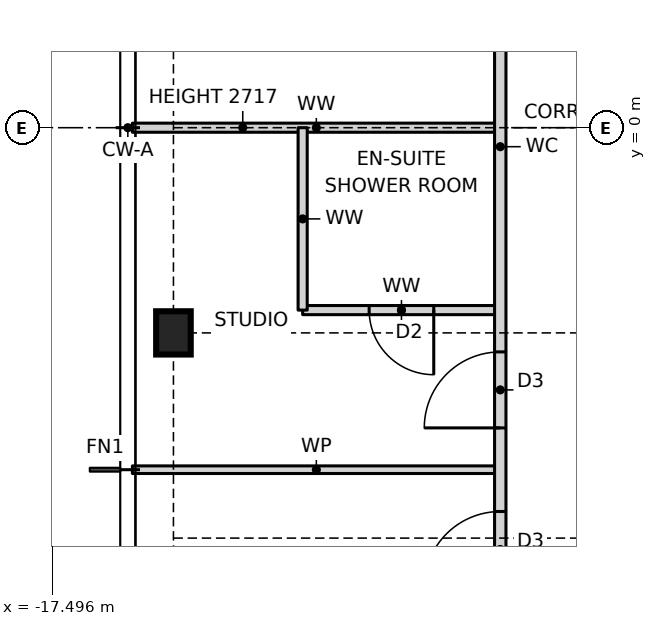
"""IFC4 building model, lengths in metres.
Left out: names, types, materials, properties, quantities, classifications, styles, units other than length and angle.
Written with IfcOpenShell. Run it as: python <this file> out.ifc"""

import sys

from ifc_helpers import new_model, si_unit, direction, frame, frame_2d, origin, origin_2d, place, context, subcontext, project, spatial, rectangle, i_section, extrude, element, fill, save


model = new_model("IFC4")
c1 = context("Model", 3, precision=1e-05, world=origin(), true_north=direction((0.0, 1.0)))
c2 = subcontext(c1, "Body", "Model", "MODEL_VIEW")
j1 = project(units=[si_unit("LENGTHUNIT", "METRE"), si_unit("PLANEANGLEUNIT", "RADIAN")], contexts=[c1])
p1 = place(None, origin())
s1 = spatial("IfcSite", under=j1, at=p1, CompositionType="ELEMENT")
p2 = place(p1, origin())
s2 = spatial("IfcBuilding", under=s1, at=p2, CompositionType="ELEMENT")
p3 = place(p2, frame((0.0, 0.0, 264.0)))
s3 = spatial("IfcBuildingStorey", under=s2, at=p3, CompositionType="ELEMENT", Elevation=264.0)
p4 = place(p3, frame((-15.9, -2.7, 0.0), z_axis=(0.0, 0.0, 1.0), x_axis=(1.0, 0.0, 0.0)))
e1 = element("IfcColumn", 1, at=p4, inside=s3, PredefinedType="COLUMN", context=c2, shape_type="SweptSolid", body=[
    extrude(i_section(OverallWidth=0.455, OverallDepth=0.569, WebThickness=0.078, FlangeThickness=0.125, at=origin_2d()), origin(), (0.0, 0.0, 1.0), 3.5),
])
p5 = place(p3, frame((-16.44, -4.5, 0.0), z_axis=(0.0, 0.0, 1.0), x_axis=(1.0, 0.0, 0.0)))
e2 = element("IfcWall", 2, at=p5, inside=s3, PredefinedType="PARTITIONING", context=c2, shape_type="SweptSolid", body=[
    extrude(rectangle(XDim=4.84, YDim=0.1, at=frame_2d((2.42, 0.0))), origin(), (0.0, 0.0, 1.0), 3.25),
])
p6 = place(p3, frame((-14.2, -2.4, 0.0), z_axis=(0.0, 0.0, 1.0), x_axis=(1.0, 0.0, 0.0)))
e3 = element("IfcWall", 3, at=p6, inside=s3, PredefinedType="PARTITIONING", context=c2, shape_type="SweptSolid", body=[
    extrude(rectangle(XDim=2.6, YDim=0.12, at=frame_2d((1.3, 0.0))), origin(), (0.0, 0.0, 1.0), 3.25),
])
p7 = place(p6, frame((0.875, 0.0, 0.0)))
e4 = element("IfcOpeningElement", 4, at=p7, cuts=e3, PredefinedType="OPENING", context=c2, shape_type="SweptSolid", body=[
    extrude(rectangle(XDim=0.85, YDim=2.1, at=frame_2d((0.425, 1.05))), frame((0.0, 0.07, 0.0), z_axis=(0.0, -1.0, 0.0), x_axis=(1.0, 0.0, 0.0)), (0.0, 0.0, 1.0), 0.14),
])
p8 = place(p3, frame((-16.44, 0.0, 0.0), z_axis=(0.0, 0.0, 1.0), x_axis=(1.0, 0.0, 0.0)))
e5 = element("IfcWall", 5, at=p8, inside=s3, PredefinedType="PARTITIONING", context=c2, shape_type="SweptSolid", body=[
    extrude(rectangle(XDim=4.84, YDim=0.12, at=frame_2d((2.42, 0.0))), origin(), (0.0, 0.0, 1.0), 2.717),
])
p9 = place(p3, frame((-11.6, -12.1, 0.0), z_axis=(0.0, 0.0, 1.0), x_axis=(0.0, 1.0, 0.0)))
e6 = element("IfcWall", 6, at=p9, inside=s3, PredefinedType="PARTITIONING", context=c2, shape_type="SweptSolid", body=[
    extrude(rectangle(XDim=23.7, YDim=0.15, at=frame_2d((11.85, 0.0))), origin(), (0.0, 0.0, 1.0), 3.25),
])
p10 = place(p9, frame((17.15, 0.0, 0.0)))
e7 = element("IfcOpeningElement", 7, at=p10, cuts=e6, PredefinedType="OPENING", context=c2, shape_type="SweptSolid", body=[
    extrude(rectangle(XDim=1.0, YDim=2.1, at=frame_2d((0.5, 1.05))), frame((0.0, 0.085, 0.0), z_axis=(0.0, -1.0, 0.0), x_axis=(1.0, 0.0, 0.0)), (0.0, 0.0, 1.0), 0.17),
])
p11 = place(p9, frame((13.45, 0.0, 0.0)))
e8 = element("IfcOpeningElement", 8, at=p11, cuts=e6, PredefinedType="OPENING", context=c2, shape_type="SweptSolid", body=[
    extrude(rectangle(XDim=1.8, YDim=2.1, at=frame_2d((0.9, 1.05))), frame((0.0, 0.085, 0.0), z_axis=(0.0, -1.0, 0.0), x_axis=(1.0, 0.0, 0.0)), (0.0, 0.0, 1.0), 0.17),
])
p12 = place(p9, frame((8.15, 0.0, 0.0)))
e9 = element("IfcOpeningElement", 9, at=p12, cuts=e6, PredefinedType="OPENING", context=c2, shape_type="SweptSolid", body=[
    extrude(rectangle(XDim=1.0, YDim=2.1, at=frame_2d((0.5, 1.05))), frame((0.0, 0.085, 0.0), z_axis=(0.0, -1.0, 0.0), x_axis=(1.0, 0.0, 0.0)), (0.0, 0.0, 1.0), 0.17),
])
p13 = place(p9, frame((6.05, 0.0, 0.0)))
e10 = element("IfcOpeningElement", 10, at=p13, cuts=e6, PredefinedType="OPENING", context=c2, shape_type="SweptSolid", body=[
    extrude(rectangle(XDim=1.0, YDim=2.1, at=frame_2d((0.5, 1.05))), frame((0.0, 0.085, 0.0), z_axis=(0.0, -1.0, 0.0), x_axis=(1.0, 0.0, 0.0)), (0.0, 0.0, 1.0), 0.17),
])
p14 = place(p9, frame((0.65, 0.0, 0.0)))
e11 = element("IfcOpeningElement", 11, at=p14, cuts=e6, PredefinedType="OPENING", context=c2, shape_type="SweptSolid", body=[
    extrude(rectangle(XDim=1.8, YDim=2.1, at=frame_2d((0.9, 1.05))), frame((0.0, 0.085, 0.0), z_axis=(0.0, -1.0, 0.0), x_axis=(1.0, 0.0, 0.0)), (0.0, 0.0, 1.0), 0.17),
])
p15 = place(p3, frame((-14.2, -2.4, 0.0), z_axis=(0.0, 0.0, 1.0), x_axis=(0.0, 1.0, 0.0)))
e12 = element("IfcWall", 12, at=p15, inside=s3, PredefinedType="PARTITIONING", context=c2, shape_type="SweptSolid", body=[
    extrude(rectangle(XDim=2.4, YDim=0.12, at=frame_2d((1.2, 0.0))), origin(), (0.0, 0.0, 1.0), 3.25),
])
p16 = place(p12, origin())
e13 = element("IfcDoor", 13, at=p16, inside=s3, OperationType="SINGLE_SWING_LEFT", PredefinedType="DOOR", context=c2, shape_type="SweptSolid", body=[
    extrude(rectangle(XDim=1.0, YDim=2.1, at=frame_2d((0.5, 1.05))), frame((0.0, 0.025, 0.0), z_axis=(0.0, -1.0, 0.0), x_axis=(1.0, 0.0, 0.0)), (0.0, 0.0, 1.0), 0.05),
])
fill(e9, e13)
p17 = place(p7, frame((0.85, 0.0, 0.0), z_axis=(0.0, 0.0, 1.0), x_axis=(-1.0, 0.0, 0.0)))
e14 = element("IfcDoor", 14, at=p17, inside=s3, OperationType="SINGLE_SWING_LEFT", PredefinedType="DOOR", context=c2, shape_type="SweptSolid", body=[
    extrude(rectangle(XDim=0.85, YDim=2.1, at=frame_2d((0.425, 1.05))), frame((0.0, 0.025, 0.0), z_axis=(0.0, -1.0, 0.0), x_axis=(1.0, 0.0, 0.0)), (0.0, 0.0, 1.0), 0.05),
])
fill(e4, e14)
p18 = place(p13, origin())
e15 = element("IfcDoor", 15, at=p18, inside=s3, OperationType="SINGLE_SWING_LEFT", PredefinedType="DOOR", context=c2, shape_type="SweptSolid", body=[
    extrude(rectangle(XDim=1.0, YDim=2.1, at=frame_2d((0.5, 1.05))), frame((0.0, 0.025, 0.0), z_axis=(0.0, -1.0, 0.0), x_axis=(1.0, 0.0, 0.0)), (0.0, 0.0, 1.0), 0.05),
])
fill(e10, e15)
save(model, sys.argv[1])
